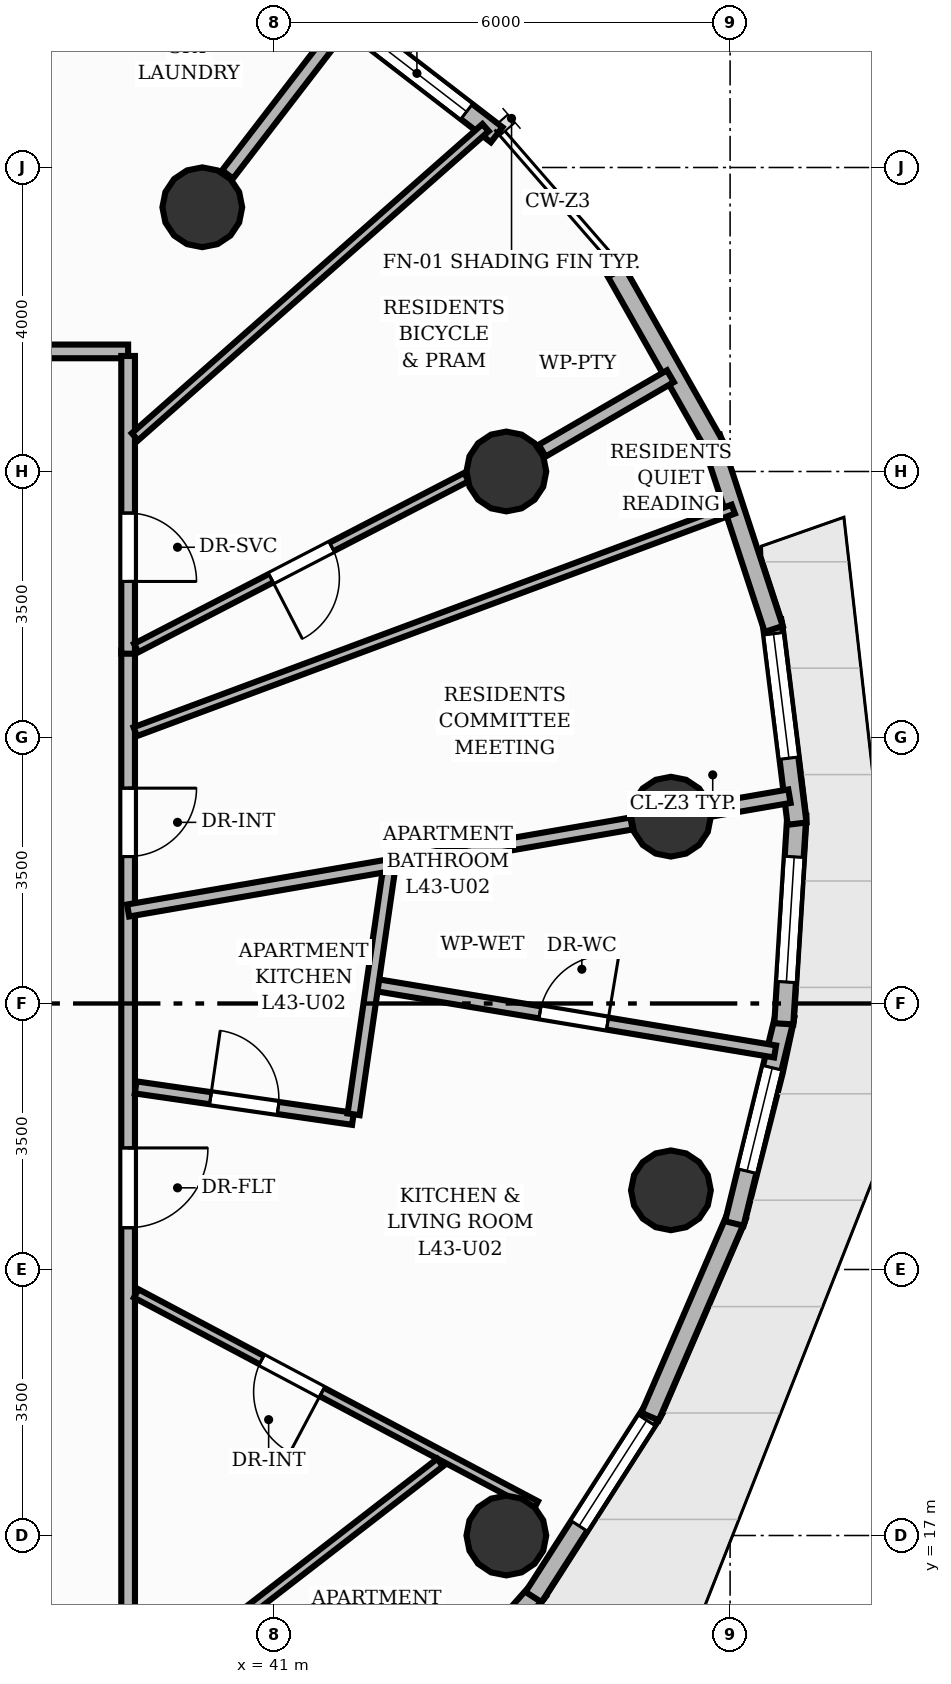
"""IFC4 building model, lengths in metres.
Left out: names, types, materials, properties, quantities, classifications, styles, units other than length and angle.
Written with IfcOpenShell. Run it as: python <this file> out.ifc"""

import sys

from ifc_helpers import new_model, si_unit, direction, frame, frame_2d, origin, origin_2d, place, context, subcontext, project, spatial, rectangle, circle, extrude, element, fill, save


model = new_model("IFC4")
c1 = context("Model", 3, precision=1e-05, world=origin(), true_north=direction((0.0, 1.0)))
c2 = subcontext(c1, "Body", "Model", "MODEL_VIEW")
j1 = project(units=[si_unit("LENGTHUNIT", "METRE"), si_unit("PLANEANGLEUNIT", "RADIAN")], contexts=[c1])
p1 = place(None, origin())
s1 = spatial("IfcSite", under=j1, at=p1, CompositionType="ELEMENT")
p2 = place(p1, origin())
s2 = spatial("IfcBuilding", under=s1, at=p2, CompositionType="ELEMENT")
p3 = place(p2, frame((0.0, 0.0, 145.76)))
s3 = spatial("IfcBuildingStorey", under=s2, at=p3, CompositionType="ELEMENT", Elevation=145.76)
for number, where, z_axis, x_axis in (
    (1, (46.221, 26.458, 0.0), (0.0, 0.0, 1.0), (1.0, 0.0, 0.0)),
    (2, (44.056, 31.0, 0.0), (0.0, 0.0, 1.0), (1.0, 0.0, 0.0)),
    (3, (40.056, 34.477, 0.0), (0.0, 0.0, 1.0), (1.0, 0.0, 0.0)),
    (4, (44.056, 17.0, 0.0), (0.0, 0.0, 1.0), (1.0, 0.0, 0.0)),
    (5, (46.221, 21.542, 0.0), (0.0, 0.0, 1.0), (1.0, 0.0, 0.0)),
):
    element("IfcColumn", number, at=place(p3, frame(where, z_axis=z_axis, x_axis=x_axis)), inside=s3, PredefinedType="COLUMN", context=c2, shape_type="SweptSolid", body=[
        extrude(circle(Radius=0.525, at=origin_2d()), origin(), (0.0, 0.0, 1.0), 3.2),
    ])
p4 = place(p3, frame((41.831, 37.046, 0.0), z_axis=(0.0, 0.0, 1.0), x_axis=(0.7923805969, -0.610027040103, 0.0)))
e6 = element("IfcWall", 6, at=p4, inside=s3, PredefinedType="SOLIDWALL", context=c2, shape_type="SweptSolid", body=[
    extrude(rectangle(XDim=2.648, YDim=0.25, at=frame_2d((1.324, 0.0))), origin(), (0.0, 0.0, 1.0), 2.96),
])
p5 = place(p4, frame((0.499, 0.0, 0.85)))
e7 = element("IfcOpeningElement", 7, at=p5, cuts=e6, PredefinedType="OPENING", context=c2, shape_type="SweptSolid", body=[
    extrude(rectangle(XDim=1.65, YDim=1.55, at=frame_2d((0.825, 0.775))), frame((0.0, 0.135, 0.0), z_axis=(0.0, -1.0, 0.0), x_axis=(1.0, 0.0, 0.0)), (0.0, 0.0, 1.0), 0.27),
])
p6 = place(p3, frame((44.48, 16.277, 0.0), z_axis=(0.0, 0.0, 1.0), x_axis=(-0.664002369324, -0.747730468506, 0.0)))
e8 = element("IfcWall", 8, at=p6, inside=s3, PredefinedType="SOLIDWALL", context=c2, shape_type="SweptSolid", body=[
    extrude(rectangle(XDim=2.977, YDim=0.25, at=frame_2d((1.489, 0.0))), origin(), (0.0, 0.0, 1.0), 2.96),
])
p7 = place(p3, frame((45.998, 18.663, 0.0), z_axis=(0.0, 0.0, 1.0), x_axis=(-0.539492373821, -0.841990486044, 0.0)))
e9 = element("IfcWall", 9, at=p7, inside=s3, PredefinedType="SOLIDWALL", context=c2, shape_type="SweptSolid", body=[
    extrude(rectangle(XDim=2.937, YDim=0.25, at=frame_2d((1.469, 0.0))), origin(), (0.0, 0.0, 1.0), 2.96),
])
p8 = place(p7, frame((0.175, 0.0, 0.85)))
e10 = element("IfcOpeningElement", 10, at=p8, cuts=e9, PredefinedType="OPENING", context=c2, shape_type="SweptSolid", body=[
    extrude(rectangle(XDim=1.65, YDim=1.55, at=frame_2d((0.825, 0.775))), frame((0.0, 0.135, 0.0), z_axis=(0.0, -1.0, 0.0), x_axis=(1.0, 0.0, 0.0)), (0.0, 0.0, 1.0), 0.27),
])
p9 = place(p3, frame((47.091, 21.211, 0.0), z_axis=(0.0, 0.0, 1.0), x_axis=(-0.397015319193, -0.917811983102, 0.0)))
e11 = element("IfcWall", 11, at=p9, inside=s3, PredefinedType="SOLIDWALL", context=c2, shape_type="SweptSolid", body=[
    extrude(rectangle(XDim=2.882, YDim=0.25, at=frame_2d((1.441, 0.0))), origin(), (0.0, 0.0, 1.0), 2.96),
])
p10 = place(p3, frame((47.723, 23.843, 0.0), z_axis=(0.0, 0.0, 1.0), x_axis=(-0.236986101123, -0.971513040507, 0.0)))
e12 = element("IfcWall", 12, at=p10, inside=s3, PredefinedType="SOLIDWALL", context=c2, shape_type="SweptSolid", body=[
    extrude(rectangle(XDim=2.818, YDim=0.25, at=frame_2d((1.409, 0.0))), origin(), (0.0, 0.0, 1.0), 2.96),
])
p11 = place(p10, frame((0.709, 0.0, 0.85)))
e13 = element("IfcOpeningElement", 13, at=p11, cuts=e12, PredefinedType="OPENING", context=c2, shape_type="SweptSolid", body=[
    extrude(rectangle(XDim=1.4, YDim=1.55, at=frame_2d((0.7, 0.775))), frame((0.0, 0.135, 0.0), z_axis=(0.0, -1.0, 0.0), x_axis=(1.0, 0.0, 0.0)), (0.0, 0.0, 1.0), 0.27),
])
p12 = place(p3, frame((47.878, 26.479, 0.0), z_axis=(0.0, 0.0, 1.0), x_axis=(-0.062278868317, -0.998058787127, 0.0)))
e14 = element("IfcWall", 14, at=p12, inside=s3, PredefinedType="SOLIDWALL", context=c2, shape_type="SweptSolid", body=[
    extrude(rectangle(XDim=2.752, YDim=0.25, at=frame_2d((1.376, 0.0))), origin(), (0.0, 0.0, 1.0), 2.96),
])
p13 = place(p12, frame((0.551, 0.0, 0.85)))
e15 = element("IfcOpeningElement", 15, at=p13, cuts=e14, PredefinedType="OPENING", context=c2, shape_type="SweptSolid", body=[
    extrude(rectangle(XDim=1.65, YDim=1.55, at=frame_2d((0.825, 0.775))), frame((0.0, 0.135, 0.0), z_axis=(0.0, -1.0, 0.0), x_axis=(1.0, 0.0, 0.0)), (0.0, 0.0, 1.0), 0.27),
])
p14 = place(p3, frame((47.549, 29.039, 0.0), z_axis=(0.0, 0.0, 1.0), x_axis=(0.123197890413, -0.992382123881, 0.0)))
e16 = element("IfcWall", 16, at=p14, inside=s3, PredefinedType="SOLIDWALL", context=c2, shape_type="SweptSolid", body=[
    extrude(rectangle(XDim=2.693, YDim=0.25, at=frame_2d((1.347, 0.0))), origin(), (0.0, 0.0, 1.0), 2.96),
])
p15 = place(p14, frame((0.175, 0.0, 0.85)))
e17 = element("IfcOpeningElement", 17, at=p15, cuts=e16, PredefinedType="OPENING", context=c2, shape_type="SweptSolid", body=[
    extrude(rectangle(XDim=1.65, YDim=1.55, at=frame_2d((0.825, 0.775))), frame((0.0, 0.135, 0.0), z_axis=(0.0, -1.0, 0.0), x_axis=(1.0, 0.0, 0.0)), (0.0, 0.0, 1.0), 0.27),
])
p16 = place(p3, frame((46.749, 31.444, 0.0), z_axis=(0.0, 0.0, 1.0), x_axis=(0.311522010952, -0.950238936633, 0.0)))
e18 = element("IfcWall", 18, at=p16, inside=s3, PredefinedType="SOLIDWALL", context=c2, shape_type="SweptSolid", body=[
    extrude(rectangle(XDim=2.648, YDim=0.25, at=frame_2d((1.324, 0.0))), origin(), (0.0, 0.0, 1.0), 2.96),
])
p17 = place(p3, frame((45.502, 33.623, 0.0), z_axis=(0.0, 0.0, 1.0), x_axis=(0.492909281161, -0.870080709214, 0.0)))
e19 = element("IfcWall", 19, at=p17, inside=s3, PredefinedType="SOLIDWALL", context=c2, shape_type="SweptSolid", body=[
    extrude(rectangle(XDim=2.624, YDim=0.25, at=frame_2d((1.312, 0.0))), origin(), (0.0, 0.0, 1.0), 2.96),
])
p18 = place(p3, frame((46.758, 26.551, 0.0), z_axis=(0.0, 0.0, 1.0), x_axis=(0.985390767806, 0.170308645474, 0.0)))
e20 = element("IfcWall", 20, at=p18, inside=s3, PredefinedType="PARTITIONING", context=c2, shape_type="SweptSolid", body=[
    extrude(rectangle(XDim=1.038, YDim=0.18, at=frame_2d((0.519, 0.0))), origin(), (0.0, 0.0, 1.0), 2.336),
])
p19 = place(p3, frame((44.528, 31.274, 0.0), z_axis=(0.0, 0.0, 1.0), x_axis=(0.864802971131, 0.502111363268, 0.0)))
e21 = element("IfcWall", 21, at=p19, inside=s3, PredefinedType="PARTITIONING", context=c2, shape_type="SweptSolid", body=[
    extrude(rectangle(XDim=1.951, YDim=0.18, at=frame_2d((0.975, 0.0))), origin(), (0.0, 0.0, 1.0), 2.336),
])
p20 = place(p3, frame((40.388, 34.908, 0.0), z_axis=(0.0, 0.0, 1.0), x_axis=(0.609556175004, 0.792742877303, 0.0)))
e22 = element("IfcWall", 22, at=p20, inside=s3, PredefinedType="PARTITIONING", context=c2, shape_type="SweptSolid", body=[
    extrude(rectangle(XDim=2.519, YDim=0.18, at=frame_2d((1.259, 0.0))), origin(), (0.0, 0.0, 1.0), 2.336),
])
p21 = place(p3, frame((39.08, 28.645, 0.0), z_axis=(0.0, 0.0, 1.0), x_axis=(0.0, -1.0, 0.0)))
e23 = element("IfcWall", 23, at=p21, inside=s3, PredefinedType="PARTITIONING", context=c2, shape_type="SweptSolid", body=[
    extrude(rectangle(XDim=13.225, YDim=0.18, at=frame_2d((6.613, 0.0))), origin(), (0.0, 0.0, 1.0), 2.955),
])
p22 = place(p21, frame((6.545, 0.0, 0.0)))
e24 = element("IfcOpeningElement", 24, at=p22, cuts=e23, PredefinedType="OPENING", context=c2, shape_type="SweptSolid", body=[
    extrude(rectangle(XDim=1.05, YDim=2.15, at=frame_2d((0.525, 1.075))), frame((0.0, 0.1, 0.0), z_axis=(0.0, -1.0, 0.0), x_axis=(1.0, 0.0, 0.0)), (0.0, 0.0, 1.0), 0.2),
])
p23 = place(p21, frame((1.812, 0.0, 0.0)))
e25 = element("IfcOpeningElement", 25, at=p23, cuts=e23, PredefinedType="OPENING", context=c2, shape_type="SweptSolid", body=[
    extrude(rectangle(XDim=0.9, YDim=2.1, at=frame_2d((0.45, 1.05))), frame((0.0, 0.1, 0.0), z_axis=(0.0, -1.0, 0.0), x_axis=(1.0, 0.0, 0.0)), (0.0, 0.0, 1.0), 0.2),
])
p24 = place(p3, frame((21.42, 32.58, 0.0), z_axis=(0.0, 0.0, 1.0), x_axis=(1.0, 0.0, 0.0)))
e26 = element("IfcWall", 26, at=p24, inside=s3, PredefinedType="PARTITIONING", context=c2, shape_type="SweptSolid", body=[
    extrude(rectangle(XDim=17.66, YDim=0.18, at=frame_2d((8.83, 0.0))), origin(), (0.0, 0.0, 1.0), 2.955),
])
p25 = place(p24, frame((13.001, 0.0, 0.0)))
e27 = element("IfcOpeningElement", 27, at=p25, cuts=e26, PredefinedType="OPENING", context=c2, shape_type="SweptSolid", body=[
    extrude(rectangle(XDim=0.9, YDim=2.1, at=frame_2d((0.45, 1.05))), frame((0.0, 0.1, 0.0), z_axis=(0.0, -1.0, 0.0), x_axis=(1.0, 0.0, 0.0)), (0.0, 0.0, 1.0), 0.2),
])
p26 = place(p24, frame((15.547, 0.0, 0.0)))
e28 = element("IfcOpeningElement", 28, at=p26, cuts=e26, PredefinedType="OPENING", context=c2, shape_type="SweptSolid", body=[
    extrude(rectangle(XDim=0.9, YDim=2.1, at=frame_2d((0.45, 1.05))), frame((0.0, 0.1, 0.0), z_axis=(0.0, -1.0, 0.0), x_axis=(1.0, 0.0, 0.0)), (0.0, 0.0, 1.0), 0.2),
])
p27 = place(p24, frame((5.757, 0.0, 0.0)))
e29 = element("IfcOpeningElement", 29, at=p27, cuts=e26, PredefinedType="OPENING", context=c2, shape_type="SweptSolid", body=[
    extrude(rectangle(XDim=1.05, YDim=2.15, at=frame_2d((0.525, 1.075))), frame((0.0, 0.1, 0.0), z_axis=(0.0, -1.0, 0.0), x_axis=(1.0, 0.0, 0.0)), (0.0, 0.0, 1.0), 0.2),
])
p28 = place(p3, frame((39.08, 32.52, 0.0), z_axis=(0.0, 0.0, 1.0), x_axis=(0.0, -1.0, 0.0)))
e30 = element("IfcWall", 30, at=p28, inside=s3, PredefinedType="PARTITIONING", context=c2, shape_type="SweptSolid", body=[
    extrude(rectangle(XDim=3.918, YDim=0.18, at=frame_2d((1.959, 0.0))), origin(), (0.0, 0.0, 1.0), 2.955),
])
p29 = place(p28, frame((2.067, 0.0, 0.0)))
e31 = element("IfcOpeningElement", 31, at=p29, cuts=e30, PredefinedType="OPENING", context=c2, shape_type="SweptSolid", body=[
    extrude(rectangle(XDim=0.9, YDim=2.1, at=frame_2d((0.45, 1.05))), frame((0.0, 0.1, 0.0), z_axis=(0.0, -1.0, 0.0), x_axis=(1.0, 0.0, 0.0)), (0.0, 0.0, 1.0), 0.2),
])
p30 = place(p3, frame((42.294, 24.25, 0.0), z_axis=(0.0, 0.0, 1.0), x_axis=(0.986430753195, -0.164177858287, 0.0)))
e32 = element("IfcWall", 32, at=p30, inside=s3, PredefinedType="PLUMBINGWALL", context=c2, shape_type="SweptSolid", body=[
    extrude(rectangle(XDim=5.371, YDim=0.16, at=frame_2d((2.686, 0.0))), origin(), (0.0, 0.0, 1.0), 2.955),
])
p31 = place(p30, frame((2.236, 0.0, 0.0)))
e33 = element("IfcOpeningElement", 33, at=p31, cuts=e32, PredefinedType="OPENING", context=c2, shape_type="SweptSolid", body=[
    extrude(rectangle(XDim=0.9, YDim=2.1, at=frame_2d((0.45, 1.05))), frame((0.0, 0.09, 0.0), z_axis=(0.0, -1.0, 0.0), x_axis=(1.0, 0.0, 0.0)), (0.0, 0.0, 1.0), 0.18),
])
p32 = place(p3, frame((44.443, 17.395, 0.0), z_axis=(0.0, 0.0, 1.0), x_axis=(-0.883258541518, 0.468886285612, 0.0)))
e34 = element("IfcWall", 34, at=p32, inside=s3, PredefinedType="PARTITIONING", context=c2, shape_type="SweptSolid", body=[
    extrude(rectangle(XDim=5.952, YDim=0.125, at=frame_2d((2.976, 0.0))), origin(), (0.0, 0.0, 1.0), 2.955),
])
p33 = place(p32, frame((3.184, 0.0, 0.0)))
e35 = element("IfcOpeningElement", 35, at=p33, cuts=e34, PredefinedType="OPENING", context=c2, shape_type="SweptSolid", body=[
    extrude(rectangle(XDim=0.9, YDim=2.1, at=frame_2d((0.45, 1.05))), frame((0.0, 0.073, 0.0), z_axis=(0.0, -1.0, 0.0), x_axis=(1.0, 0.0, 0.0)), (0.0, 0.0, 1.0), 0.145),
])
p34 = place(p3, frame((39.179, 22.896, 0.0), z_axis=(0.0, 0.0, 1.0), x_axis=(0.989697773488, -0.143172333756, 0.0)))
e36 = element("IfcWall", 36, at=p34, inside=s3, PredefinedType="PLUMBINGWALL", context=c2, shape_type="SweptSolid", body=[
    extrude(rectangle(XDim=2.889, YDim=0.16, at=frame_2d((1.444, 0.0))), origin(), (0.0, 0.0, 1.0), 2.336),
])
p35 = place(p34, frame((0.994, 0.0, 0.0)))
e37 = element("IfcOpeningElement", 37, at=p35, cuts=e36, PredefinedType="OPENING", context=c2, shape_type="SweptSolid", body=[
    extrude(rectangle(XDim=0.9, YDim=2.1, at=frame_2d((0.45, 1.05))), frame((0.0, 0.09, 0.0), z_axis=(0.0, -1.0, 0.0), x_axis=(1.0, 0.0, 0.0)), (0.0, 0.0, 1.0), 0.18),
])
p36 = place(p3, frame((42.046, 22.542, 0.0), z_axis=(0.0, 0.0, 1.0), x_axis=(0.143217612057, 0.98969122235, 0.0)))
e38 = element("IfcWall", 38, at=p36, inside=s3, PredefinedType="PLUMBINGWALL", context=c2, shape_type="SweptSolid", body=[
    extrude(rectangle(XDim=3.311, YDim=0.16, at=frame_2d((1.655, 0.0))), origin(), (0.0, 0.0, 1.0), 2.955),
])
p37 = place(p3, frame((39.08, 25.224, 0.0), z_axis=(0.0, 0.0, 1.0), x_axis=(0.985384524795, 0.17034476304, 0.0)))
e39 = element("IfcWall", 39, at=p37, inside=s3, PredefinedType="PLUMBINGWALL", context=c2, shape_type="SweptSolid", body=[
    extrude(rectangle(XDim=6.722, YDim=0.16, at=frame_2d((3.361, 0.0))), origin(), (0.0, 0.0, 1.0), 2.336),
])
p38 = place(p3, frame((43.184, 17.96, 0.0), z_axis=(0.0, 0.0, 1.0), x_axis=(-0.790862802872, -0.611993486104, 0.0)))
e40 = element("IfcWall", 40, at=p38, inside=s3, PredefinedType="PARTITIONING", context=c2, shape_type="SweptSolid", body=[
    extrude(rectangle(XDim=9.975, YDim=0.125, at=frame_2d((4.987, 0.0))), origin(), (0.0, 0.0, 1.0), 2.411),
])
p39 = place(p38, frame((3.417, 0.0, 0.0)))
e41 = element("IfcOpeningElement", 41, at=p39, cuts=e40, PredefinedType="OPENING", context=c2, shape_type="SweptSolid", body=[
    extrude(rectangle(XDim=0.9, YDim=2.1, at=frame_2d((0.45, 1.05))), frame((0.0, 0.073, 0.0), z_axis=(0.0, -1.0, 0.0), x_axis=(1.0, 0.0, 0.0)), (0.0, 0.0, 1.0), 0.145),
])
p40 = place(p3, frame((38.951, 38.323, 0.0), z_axis=(0.0, 0.0, 1.0), x_axis=(-0.484039777335, -0.875045995338, 0.0)))
e42 = element("IfcWall", 42, at=p40, inside=s3, PredefinedType="PARTITIONING", context=c2, shape_type="SweptSolid", body=[
    extrude(rectangle(XDim=6.442, YDim=0.125, at=frame_2d((3.221, 0.0))), origin(), (0.0, 0.0, 1.0), 2.955),
])
p41 = place(p3, frame((43.783, 35.524, 0.0), z_axis=(0.0, 0.0, 1.0), x_axis=(-0.750018545151, -0.661416798947, 0.0)))
e43 = element("IfcWall", 43, at=p41, inside=s3, PredefinedType="PARTITIONING", context=c2, shape_type="SweptSolid", body=[
    extrude(rectangle(XDim=6.15, YDim=0.125, at=frame_2d((3.075, 0.0))), origin(), (0.0, 0.0, 1.0), 2.692),
])
p42 = place(p3, frame((43.531, 30.927, 0.0), z_axis=(0.0, 0.0, 1.0), x_axis=(-0.888041341995, -0.459763607638, 0.0)))
e44 = element("IfcWall", 44, at=p42, inside=s3, PredefinedType="PARTITIONING", context=c2, shape_type="SweptSolid", body=[
    extrude(rectangle(XDim=4.893, YDim=0.125, at=frame_2d((2.446, 0.0))), origin(), (0.0, 0.0, 1.0), 2.336),
])
p43 = place(p42, frame((1.996, 0.0, 0.0)))
e45 = element("IfcOpeningElement", 45, at=p43, cuts=e44, PredefinedType="OPENING", context=c2, shape_type="SweptSolid", body=[
    extrude(rectangle(XDim=0.9, YDim=2.1, at=frame_2d((0.45, 1.05))), frame((0.0, 0.073, 0.0), z_axis=(0.0, -1.0, 0.0), x_axis=(1.0, 0.0, 0.0)), (0.0, 0.0, 1.0), 0.145),
])
p44 = place(p3, frame((39.174, 27.577, 0.0), z_axis=(0.0, 0.0, 1.0), x_axis=(0.9372070401, 0.348773513883, 0.0)))
e46 = element("IfcWall", 46, at=p44, inside=s3, PredefinedType="PARTITIONING", context=c2, shape_type="SweptSolid", body=[
    extrude(rectangle(XDim=8.395, YDim=0.125, at=frame_2d((4.198, 0.0))), origin(), (0.0, 0.0, 1.0), 2.692),
])
p45 = place(p5, origin())
e47 = element("IfcWindow", 47, at=p45, inside=s3, PartitioningType="SINGLE_PANEL", PredefinedType="WINDOW", context=c2, shape_type="SweptSolid", body=[
    extrude(rectangle(XDim=1.65, YDim=1.55, at=frame_2d((0.825, 0.775))), frame((0.0, 0.03, 0.0), z_axis=(0.0, -1.0, 0.0), x_axis=(1.0, 0.0, 0.0)), (0.0, 0.0, 1.0), 0.06),
])
fill(e7, e47)
p46 = place(p8, origin())
e48 = element("IfcWindow", 48, at=p46, inside=s3, PartitioningType="SINGLE_PANEL", PredefinedType="WINDOW", context=c2, shape_type="SweptSolid", body=[
    extrude(rectangle(XDim=1.65, YDim=1.55, at=frame_2d((0.825, 0.775))), frame((0.0, 0.03, 0.0), z_axis=(0.0, -1.0, 0.0), x_axis=(1.0, 0.0, 0.0)), (0.0, 0.0, 1.0), 0.06),
])
fill(e10, e48)
p47 = place(p11, origin())
e49 = element("IfcWindow", 49, at=p47, inside=s3, PartitioningType="SINGLE_PANEL", PredefinedType="WINDOW", context=c2, shape_type="SweptSolid", body=[
    extrude(rectangle(XDim=1.4, YDim=1.55, at=frame_2d((0.7, 0.775))), frame((0.0, 0.03, 0.0), z_axis=(0.0, -1.0, 0.0), x_axis=(1.0, 0.0, 0.0)), (0.0, 0.0, 1.0), 0.06),
])
fill(e13, e49)
p48 = place(p13, origin())
e50 = element("IfcWindow", 50, at=p48, inside=s3, PartitioningType="SINGLE_PANEL", PredefinedType="WINDOW", context=c2, shape_type="SweptSolid", body=[
    extrude(rectangle(XDim=1.65, YDim=1.55, at=frame_2d((0.825, 0.775))), frame((0.0, 0.03, 0.0), z_axis=(0.0, -1.0, 0.0), x_axis=(1.0, 0.0, 0.0)), (0.0, 0.0, 1.0), 0.06),
])
fill(e15, e50)
p49 = place(p15, origin())
e51 = element("IfcWindow", 51, at=p49, inside=s3, PartitioningType="SINGLE_PANEL", PredefinedType="WINDOW", context=c2, shape_type="SweptSolid", body=[
    extrude(rectangle(XDim=1.65, YDim=1.55, at=frame_2d((0.825, 0.775))), frame((0.0, 0.03, 0.0), z_axis=(0.0, -1.0, 0.0), x_axis=(1.0, 0.0, 0.0)), (0.0, 0.0, 1.0), 0.06),
])
fill(e17, e51)
p50 = place(p22, origin())
e52 = element("IfcDoor", 52, at=p50, inside=s3, OperationType="SINGLE_SWING_LEFT", PredefinedType="DOOR", context=c2, shape_type="SweptSolid", body=[
    extrude(rectangle(XDim=1.05, YDim=2.15, at=frame_2d((0.525, 1.075))), frame((0.0, 0.025, 0.0), z_axis=(0.0, -1.0, 0.0), x_axis=(1.0, 0.0, 0.0)), (0.0, 0.0, 1.0), 0.05),
])
fill(e24, e52)
p51 = place(p31, origin())
e53 = element("IfcDoor", 53, at=p51, inside=s3, OperationType="SINGLE_SWING_RIGHT", PredefinedType="DOOR", context=c2, shape_type="SweptSolid", body=[
    extrude(rectangle(XDim=0.9, YDim=2.1, at=frame_2d((0.45, 1.05))), frame((0.0, 0.025, 0.0), z_axis=(0.0, -1.0, 0.0), x_axis=(1.0, 0.0, 0.0)), (0.0, 0.0, 1.0), 0.05),
])
fill(e33, e53)
p52 = place(p33, origin())
e54 = element("IfcDoor", 54, at=p52, inside=s3, OperationType="SINGLE_SWING_LEFT", PredefinedType="DOOR", context=c2, shape_type="SweptSolid", body=[
    extrude(rectangle(XDim=0.9, YDim=2.1, at=frame_2d((0.45, 1.05))), frame((0.0, 0.025, 0.0), z_axis=(0.0, -1.0, 0.0), x_axis=(1.0, 0.0, 0.0)), (0.0, 0.0, 1.0), 0.05),
])
fill(e35, e54)
p53 = place(p35, origin())
e55 = element("IfcDoor", 55, at=p53, inside=s3, OperationType="SINGLE_SWING_LEFT", PredefinedType="DOOR", context=c2, shape_type="SweptSolid", body=[
    extrude(rectangle(XDim=0.9, YDim=2.1, at=frame_2d((0.45, 1.05))), frame((0.0, 0.025, 0.0), z_axis=(0.0, -1.0, 0.0), x_axis=(1.0, 0.0, 0.0)), (0.0, 0.0, 1.0), 0.05),
])
fill(e37, e55)
p54 = place(p29, origin())
e56 = element("IfcDoor", 56, at=p54, inside=s3, OperationType="SINGLE_SWING_RIGHT", PredefinedType="DOOR", context=c2, shape_type="SweptSolid", body=[
    extrude(rectangle(XDim=0.9, YDim=2.1, at=frame_2d((0.45, 1.05))), frame((0.0, 0.025, 0.0), z_axis=(0.0, -1.0, 0.0), x_axis=(1.0, 0.0, 0.0)), (0.0, 0.0, 1.0), 0.05),
])
fill(e31, e56)
p55 = place(p23, origin())
e57 = element("IfcDoor", 57, at=p55, inside=s3, OperationType="SINGLE_SWING_LEFT", PredefinedType="DOOR", context=c2, shape_type="SweptSolid", body=[
    extrude(rectangle(XDim=0.9, YDim=2.1, at=frame_2d((0.45, 1.05))), frame((0.0, 0.025, 0.0), z_axis=(0.0, -1.0, 0.0), x_axis=(1.0, 0.0, 0.0)), (0.0, 0.0, 1.0), 0.05),
])
fill(e25, e57)
p56 = place(p43, origin())
e58 = element("IfcDoor", 58, at=p56, inside=s3, OperationType="SINGLE_SWING_RIGHT", PredefinedType="DOOR", context=c2, shape_type="SweptSolid", body=[
    extrude(rectangle(XDim=0.9, YDim=2.1, at=frame_2d((0.45, 1.05))), frame((0.0, 0.025, 0.0), z_axis=(0.0, -1.0, 0.0), x_axis=(1.0, 0.0, 0.0)), (0.0, 0.0, 1.0), 0.05),
])
fill(e45, e58)
save(model, sys.argv[1])
